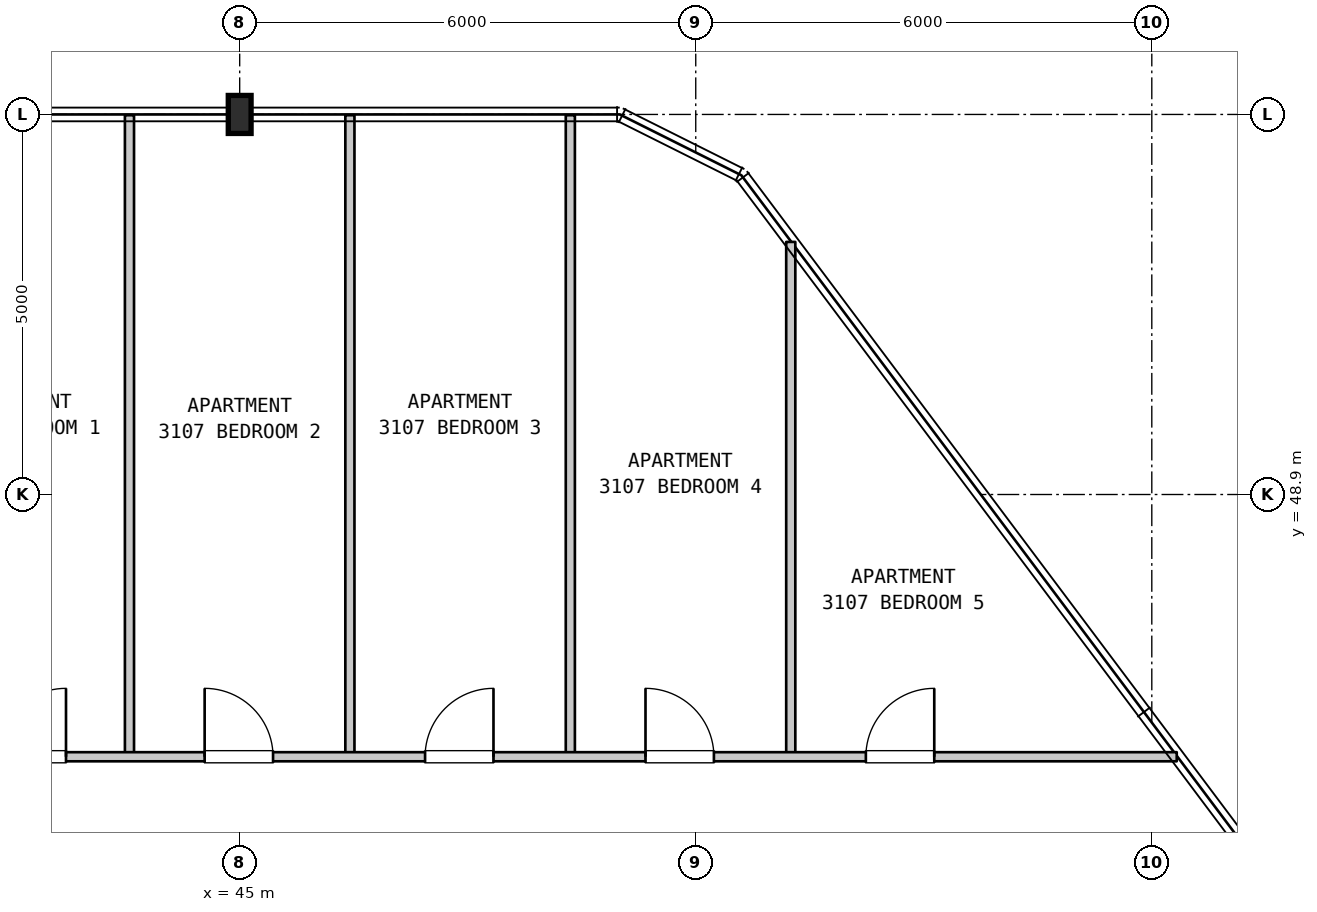
"""IFC4 building model, lengths in metres.
Left out: names, types, materials, properties, quantities, classifications, styles, units other than length and angle.
Written with IfcOpenShell. Run it as: python <this file> out.ifc"""

import sys

from ifc_helpers import new_model, si_unit, direction, frame, frame_2d, origin, origin_2d, place, context, subcontext, project, spatial, rectangle, i_section, extrude, element, fill, save


model = new_model("IFC4")
c1 = context("Model", 3, precision=1e-05, world=origin(), true_north=direction((0.0, 1.0)))
c2 = subcontext(c1, "Body", "Model", "MODEL_VIEW")
j1 = project(units=[si_unit("LENGTHUNIT", "METRE"), si_unit("PLANEANGLEUNIT", "RADIAN")], contexts=[c1])
p1 = place(None, origin())
s1 = spatial("IfcSite", under=j1, at=p1, CompositionType="ELEMENT")
p2 = place(p1, origin())
s2 = spatial("IfcBuilding", under=s1, at=p2, CompositionType="ELEMENT")
p3 = place(p2, frame((0.0, 0.0, 129.8)))
s3 = spatial("IfcBuildingStorey", under=s2, at=p3, CompositionType="ELEMENT", Elevation=129.8)
p4 = place(p3, frame((45.0, 53.9, 0.0), z_axis=(0.0, 0.0, 1.0), x_axis=(1.0, 0.0, 0.0)))
e1 = element("IfcColumn", 1, at=p4, inside=s3, PredefinedType="COLUMN", context=c2, shape_type="SweptSolid", body=[
    extrude(i_section(OverallWidth=0.3, OverallDepth=0.5, WebThickness=0.014, FlangeThickness=0.028, FilletRadius=0.027, at=origin_2d()), origin(), (0.0, 0.0, 1.0), 3.7),
])
for number, where, z_axis, x_axis in (
    (2, (43.55, 45.45, 0.0), (0.0, 0.0, 1.0), (0.0, 1.0, 0.0)),
    (3, (46.45, 45.45, 0.0), (0.0, 0.0, 1.0), (0.0, 1.0, 0.0)),
    (4, (49.35, 45.45, 0.0), (0.0, 0.0, 1.0), (0.0, 1.0, 0.0)),
):
    element("IfcWall", number, at=place(p3, frame(where, z_axis=z_axis, x_axis=x_axis)), inside=s3, PredefinedType="PARTITIONING", context=c2, shape_type="SweptSolid", body=[
        extrude(rectangle(XDim=8.44, YDim=0.12, at=frame_2d((4.22, 0.0))), origin(), (0.0, 0.0, 1.0), 3.385),
    ])
p5 = place(p3, frame((52.25, 45.45, 0.0), z_axis=(0.0, 0.0, 1.0), x_axis=(0.0, 1.0, 0.0)))
e5 = element("IfcWall", 5, at=p5, inside=s3, PredefinedType="PARTITIONING", context=c2, shape_type="SweptSolid", body=[
    extrude(rectangle(XDim=6.773, YDim=0.12, at=frame_2d((3.386, 0.0))), origin(), (0.0, 0.0, 1.0), 3.385),
])
p6 = place(p3, frame((40.685, 45.45, 0.0), z_axis=(0.0, 0.0, 1.0), x_axis=(1.0, 0.0, 0.0)))
e6 = element("IfcWall", 6, at=p6, inside=s3, PredefinedType="PARTITIONING", context=c2, shape_type="SweptSolid", body=[
    extrude(rectangle(XDim=16.643, YDim=0.12, at=frame_2d((8.321, 0.0))), origin(), (0.0, 0.0, 1.0), 3.385),
])
p7 = place(p6, frame((1.13, 0.0, 0.0)))
e7 = element("IfcOpeningElement", 7, at=p7, cuts=e6, PredefinedType="OPENING", context=c2, shape_type="SweptSolid", body=[
    extrude(rectangle(XDim=0.9, YDim=2.15, at=frame_2d((0.45, 1.075))), frame((0.0, 0.07, 0.0), z_axis=(0.0, -1.0, 0.0), x_axis=(1.0, 0.0, 0.0)), (0.0, 0.0, 1.0), 0.14),
])
p8 = place(p6, frame((3.854, 0.0, 0.0)))
e8 = element("IfcOpeningElement", 8, at=p8, cuts=e6, PredefinedType="OPENING", context=c2, shape_type="SweptSolid", body=[
    extrude(rectangle(XDim=0.9, YDim=2.15, at=frame_2d((0.45, 1.075))), frame((0.0, 0.07, 0.0), z_axis=(0.0, -1.0, 0.0), x_axis=(1.0, 0.0, 0.0)), (0.0, 0.0, 1.0), 0.14),
])
p9 = place(p6, frame((6.754, 0.0, 0.0)))
e9 = element("IfcOpeningElement", 9, at=p9, cuts=e6, PredefinedType="OPENING", context=c2, shape_type="SweptSolid", body=[
    extrude(rectangle(XDim=0.9, YDim=2.15, at=frame_2d((0.45, 1.075))), frame((0.0, 0.07, 0.0), z_axis=(0.0, -1.0, 0.0), x_axis=(1.0, 0.0, 0.0)), (0.0, 0.0, 1.0), 0.14),
])
p10 = place(p6, frame((9.654, 0.0, 0.0)))
e10 = element("IfcOpeningElement", 10, at=p10, cuts=e6, PredefinedType="OPENING", context=c2, shape_type="SweptSolid", body=[
    extrude(rectangle(XDim=0.9, YDim=2.15, at=frame_2d((0.45, 1.075))), frame((0.0, 0.07, 0.0), z_axis=(0.0, -1.0, 0.0), x_axis=(1.0, 0.0, 0.0)), (0.0, 0.0, 1.0), 0.14),
])
p11 = place(p6, frame((12.553, 0.0, 0.0)))
e11 = element("IfcOpeningElement", 11, at=p11, cuts=e6, PredefinedType="OPENING", context=c2, shape_type="SweptSolid", body=[
    extrude(rectangle(XDim=0.9, YDim=2.15, at=frame_2d((0.45, 1.075))), frame((0.0, 0.07, 0.0), z_axis=(0.0, -1.0, 0.0), x_axis=(1.0, 0.0, 0.0)), (0.0, 0.0, 1.0), 0.14),
])
p12 = place(p7, origin())
e12 = element("IfcDoor", 12, at=p12, inside=s3, OperationType="SINGLE_SWING_RIGHT", PredefinedType="DOOR", context=c2, shape_type="SweptSolid", body=[
    extrude(rectangle(XDim=0.9, YDim=2.15, at=frame_2d((0.45, 1.075))), frame((0.0, 0.025, 0.0), z_axis=(0.0, -1.0, 0.0), x_axis=(1.0, 0.0, 0.0)), (0.0, 0.0, 1.0), 0.05),
])
fill(e7, e12)
p13 = place(p8, origin())
e13 = element("IfcDoor", 13, at=p13, inside=s3, OperationType="SINGLE_SWING_LEFT", PredefinedType="DOOR", context=c2, shape_type="SweptSolid", body=[
    extrude(rectangle(XDim=0.9, YDim=2.15, at=frame_2d((0.45, 1.075))), frame((0.0, 0.025, 0.0), z_axis=(0.0, -1.0, 0.0), x_axis=(1.0, 0.0, 0.0)), (0.0, 0.0, 1.0), 0.05),
])
fill(e8, e13)
p14 = place(p9, origin())
e14 = element("IfcDoor", 14, at=p14, inside=s3, OperationType="SINGLE_SWING_RIGHT", PredefinedType="DOOR", context=c2, shape_type="SweptSolid", body=[
    extrude(rectangle(XDim=0.9, YDim=2.15, at=frame_2d((0.45, 1.075))), frame((0.0, 0.025, 0.0), z_axis=(0.0, -1.0, 0.0), x_axis=(1.0, 0.0, 0.0)), (0.0, 0.0, 1.0), 0.05),
])
fill(e9, e14)
p15 = place(p10, origin())
e15 = element("IfcDoor", 15, at=p15, inside=s3, OperationType="SINGLE_SWING_LEFT", PredefinedType="DOOR", context=c2, shape_type="SweptSolid", body=[
    extrude(rectangle(XDim=0.9, YDim=2.15, at=frame_2d((0.45, 1.075))), frame((0.0, 0.025, 0.0), z_axis=(0.0, -1.0, 0.0), x_axis=(1.0, 0.0, 0.0)), (0.0, 0.0, 1.0), 0.05),
])
fill(e10, e15)
p16 = place(p11, origin())
e16 = element("IfcDoor", 16, at=p16, inside=s3, OperationType="SINGLE_SWING_RIGHT", PredefinedType="DOOR", context=c2, shape_type="SweptSolid", body=[
    extrude(rectangle(XDim=0.9, YDim=2.15, at=frame_2d((0.45, 1.075))), frame((0.0, 0.025, 0.0), z_axis=(0.0, -1.0, 0.0), x_axis=(1.0, 0.0, 0.0)), (0.0, 0.0, 1.0), 0.05),
])
fill(e11, e16)
save(model, sys.argv[1])
